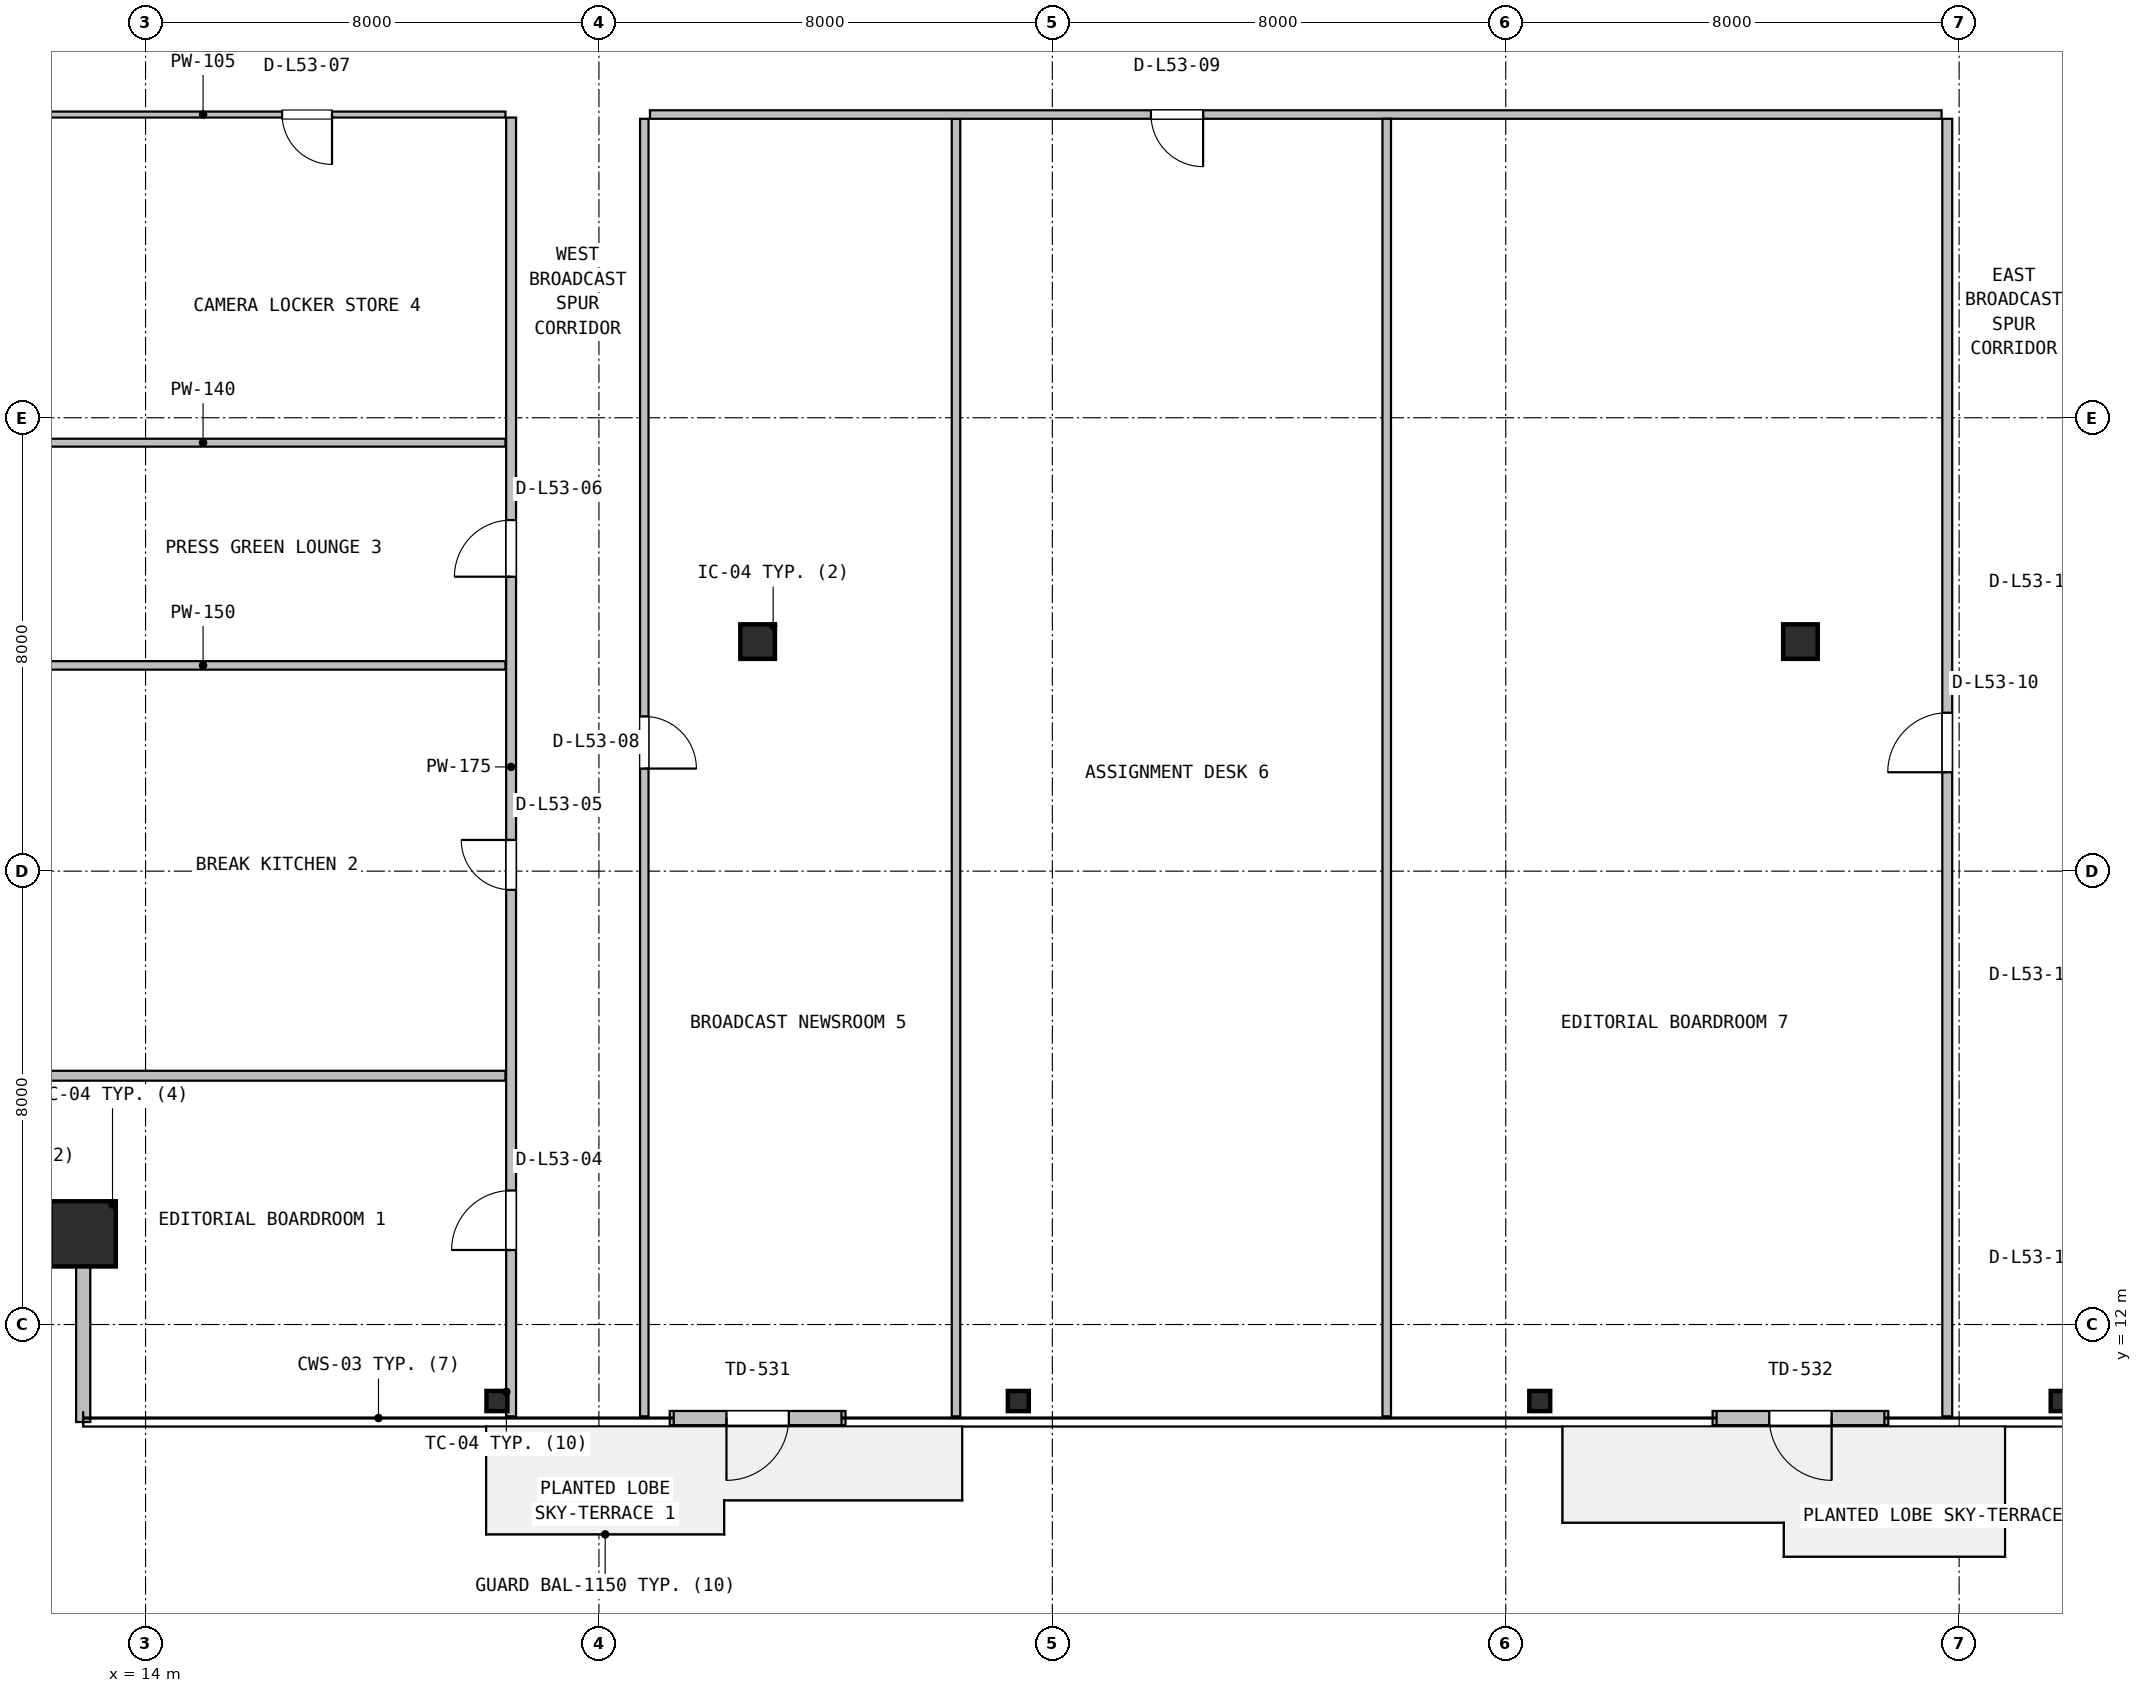
"""IFC4 building model, lengths in metres.
Left out: names, types, materials, properties, quantities, classifications, styles, units other than length and angle.
Written with IfcOpenShell. Run it as: python <this file> out.ifc"""

import sys

from ifc_helpers import new_model, si_unit, direction, frame, frame_2d, origin, origin_2d, place, context, subcontext, project, spatial, rectangle, hollow_rectangle, hollow_circle, i_section, extrude, source, transform, mapped, element, fill, save


model = new_model("IFC4")
c1 = context("Model", 3, precision=1e-05, world=origin(), true_north=direction((0.0, 1.0)))
c2 = subcontext(c1, "Body", "Model", "MODEL_VIEW")
j1 = project(units=[si_unit("LENGTHUNIT", "METRE"), si_unit("PLANEANGLEUNIT", "RADIAN")], contexts=[c1])
p1 = place(None, origin())
s1 = spatial("IfcSite", under=j1, at=p1, CompositionType="ELEMENT")
p2 = place(p1, origin())
s2 = spatial("IfcBuilding", under=s1, at=p2, CompositionType="ELEMENT")
p3 = place(p2, frame((0.0, 0.0, 215.0)))
s3 = spatial("IfcBuildingStorey", under=s2, at=p3, CompositionType="ELEMENT", Elevation=215.0)
m1 = source(origin(), c2, "Body", "SweptSolid", [
    extrude(hollow_rectangle(XDim=1.15, YDim=1.15, WallThickness=0.045, at=origin_2d()), origin(), (0.0, 0.0, 1.0), 3.8),
])
p4 = place(p3, frame((12.9, 13.6, 0.0), z_axis=(0.0, 0.0, 1.0), x_axis=(1.0, 0.0, 0.0)))
e1 = element("IfcColumn", 1, at=p4, inside=s3, PredefinedType="COLUMN", context=c2, shape_type="MappedRepresentation", body=[
    mapped(m1, transform((0.0, 0.0, 0.0), x_axis=(1.0, 0.0, 0.0), y_axis=(0.0, 1.0, 0.0), z_axis=(0.0, 0.0, 1.0), scale=1.0)),
])
m2 = source(origin(), c2, "Body", "SweptSolid", [
    extrude(i_section(OverallWidth=0.369, OverallDepth=0.356, WebThickness=0.011, FlangeThickness=0.018, FilletRadius=0.016, at=origin_2d()), origin(), (0.0, 0.0, 1.0), 3.8),
])
for number, where, z_axis, x_axis in (
    (2, (20.2, 10.65, 0.0), (0.0, 0.0, 1.0), (1.0, 0.0, 0.0)),
    (3, (29.4, 10.65, 0.0), (0.0, 0.0, 1.0), (1.0, 0.0, 0.0)),
    (4, (38.6, 10.65, 0.0), (0.0, 0.0, 1.0), (1.0, 0.0, 0.0)),
    (5, (47.8, 10.65, 0.0), (0.0, 0.0, 1.0), (1.0, 0.0, 0.0)),
):
    element("IfcColumn", number, at=place(p3, frame(where, z_axis=z_axis, x_axis=x_axis)), inside=s3, PredefinedType="COLUMN", context=c2, shape_type="MappedRepresentation", body=[
        mapped(m2, transform((0.0, 0.0, 0.0), x_axis=(1.0, 0.0, 0.0), y_axis=(0.0, 1.0, 0.0), z_axis=(0.0, 0.0, 1.0), scale=1.0)),
    ])
m3 = source(origin(), c2, "Body", "SweptSolid", [
    extrude(hollow_circle(Radius=0.305, WallThickness=0.025, at=origin_2d()), origin(), (0.0, 0.0, 1.0), 3.8),
])
for number, where, z_axis, x_axis in (
    (6, (24.8, 24.05, 0.0), (0.0, 0.0, 1.0), (1.0, 0.0, 0.0)),
    (7, (43.2, 24.05, 0.0), (0.0, 0.0, 1.0), (1.0, 0.0, 0.0)),
):
    element("IfcColumn", number, at=place(p3, frame(where, z_axis=z_axis, x_axis=x_axis)), inside=s3, PredefinedType="COLUMN", context=c2, shape_type="MappedRepresentation", body=[
        mapped(m3, transform((0.0, 0.0, 0.0), x_axis=(1.0, 0.0, 0.0), y_axis=(0.0, 1.0, 0.0), z_axis=(0.0, 0.0, 1.0), scale=1.0)),
    ])
p5 = place(p3, frame((23.25, 10.35, 0.0), z_axis=(0.0, 0.0, 1.0), x_axis=(1.0, 0.0, 0.0)))
e8 = element("IfcWall", 8, at=p5, inside=s3, PredefinedType="SOLIDWALL", context=c2, shape_type="SweptSolid", body=[
    extrude(rectangle(XDim=3.1, YDim=0.25, at=frame_2d((1.55, 0.0))), origin(), (0.0, 0.0, 1.0), 3.53),
])
p6 = place(p5, frame((1.0, 0.0, 0.0)))
e9 = element("IfcOpeningElement", 9, at=p6, cuts=e8, PredefinedType="OPENING", context=c2, shape_type="SweptSolid", body=[
    extrude(rectangle(XDim=1.1, YDim=2.15, at=frame_2d((0.55, 1.075))), frame((0.0, 0.135, 0.0), z_axis=(0.0, -1.0, 0.0), x_axis=(1.0, 0.0, 0.0)), (0.0, 0.0, 1.0), 0.27),
])
p7 = place(p3, frame((41.65, 10.35, 0.0), z_axis=(0.0, 0.0, 1.0), x_axis=(1.0, 0.0, 0.0)))
e10 = element("IfcWall", 10, at=p7, inside=s3, PredefinedType="SOLIDWALL", context=c2, shape_type="SweptSolid", body=[
    extrude(rectangle(XDim=3.1, YDim=0.25, at=frame_2d((1.55, 0.0))), origin(), (0.0, 0.0, 1.0), 3.53),
])
p8 = place(p7, frame((1.0, 0.0, 0.0)))
e11 = element("IfcOpeningElement", 11, at=p8, cuts=e10, PredefinedType="OPENING", context=c2, shape_type="SweptSolid", body=[
    extrude(rectangle(XDim=1.1, YDim=2.15, at=frame_2d((0.55, 1.075))), frame((0.0, 0.135, 0.0), z_axis=(0.0, -1.0, 0.0), x_axis=(1.0, 0.0, 0.0)), (0.0, 0.0, 1.0), 0.27),
])
p9 = place(p3, frame((12.9, 10.28, 0.0), z_axis=(0.0, 0.0, 1.0), x_axis=(0.0, 1.0, 0.0)))
e12 = element("IfcWall", 12, at=p9, inside=s3, PredefinedType="SOLIDWALL", context=c2, shape_type="SweptSolid", body=[
    extrude(rectangle(XDim=3.4, YDim=0.25, at=frame_2d((1.7, 0.0))), origin(), (0.0, 0.0, 1.0), 3.171),
])
p10 = place(p3, frame((20.45, 10.38, 0.0), z_axis=(0.0, 0.0, 1.0), x_axis=(0.0, 1.0, 0.0)))
e13 = element("IfcWall", 13, at=p10, inside=s3, PredefinedType="PARTITIONING", context=c2, shape_type="SweptSolid", body=[
    extrude(rectangle(XDim=22.917, YDim=0.175, at=frame_2d((11.458, 0.0))), origin(), (0.0, 0.0, 1.0), 3.171),
])
p11 = place(p10, frame((2.935, 0.0, 0.0)))
e14 = element("IfcOpeningElement", 14, at=p11, cuts=e13, PredefinedType="OPENING", context=c2, shape_type="SweptSolid", body=[
    extrude(rectangle(XDim=1.05, YDim=2.1, at=frame_2d((0.525, 1.05))), frame((0.0, 0.098, 0.0), z_axis=(0.0, -1.0, 0.0), x_axis=(1.0, 0.0, 0.0)), (0.0, 0.0, 1.0), 0.195),
])
p12 = place(p10, frame((9.29, 0.0, 0.0)))
e15 = element("IfcOpeningElement", 15, at=p12, cuts=e13, PredefinedType="OPENING", context=c2, shape_type="SweptSolid", body=[
    extrude(rectangle(XDim=0.88, YDim=2.06, at=frame_2d((0.44, 1.03))), frame((0.0, 0.098, 0.0), z_axis=(0.0, -1.0, 0.0), x_axis=(1.0, 0.0, 0.0)), (0.0, 0.0, 1.0), 0.195),
])
p13 = place(p10, frame((14.815, 0.0, 0.0)))
e16 = element("IfcOpeningElement", 16, at=p13, cuts=e13, PredefinedType="OPENING", context=c2, shape_type="SweptSolid", body=[
    extrude(rectangle(XDim=1.0, YDim=2.1, at=frame_2d((0.5, 1.05))), frame((0.0, 0.098, 0.0), z_axis=(0.0, -1.0, 0.0), x_axis=(1.0, 0.0, 0.0)), (0.0, 0.0, 1.0), 0.195),
])
p14 = place(p3, frame((9.68, 16.39, 0.0), z_axis=(0.0, 0.0, 1.0), x_axis=(1.0, 0.0, 0.0)))
e17 = element("IfcWall", 17, at=p14, inside=s3, PredefinedType="PARTITIONING", context=c2, shape_type="SweptSolid", body=[
    extrude(rectangle(XDim=10.67, YDim=0.175, at=frame_2d((5.335, 0.0))), origin(), (0.0, 0.0, 1.0), 3.171),
])
p15 = place(p3, frame((9.68, 23.63, 0.0), z_axis=(0.0, 0.0, 1.0), x_axis=(1.0, 0.0, 0.0)))
e18 = element("IfcWall", 18, at=p15, inside=s3, PredefinedType="PARTITIONING", context=c2, shape_type="SweptSolid", body=[
    extrude(rectangle(XDim=10.67, YDim=0.15, at=frame_2d((5.335, 0.0))), origin(), (0.0, 0.0, 1.0), 3.171),
])
p16 = place(p3, frame((9.68, 27.56, 0.0), z_axis=(0.0, 0.0, 1.0), x_axis=(1.0, 0.0, 0.0)))
e19 = element("IfcWall", 19, at=p16, inside=s3, PredefinedType="PARTITIONING", context=c2, shape_type="SweptSolid", body=[
    extrude(rectangle(XDim=10.67, YDim=0.14, at=frame_2d((5.335, 0.0))), origin(), (0.0, 0.0, 1.0), 3.171),
])
p17 = place(p3, frame((9.68, 33.35, 0.0), z_axis=(0.0, 0.0, 1.0), x_axis=(1.0, 0.0, 0.0)))
e20 = element("IfcWall", 20, at=p17, inside=s3, PredefinedType="PARTITIONING", context=c2, shape_type="SweptSolid", body=[
    extrude(rectangle(XDim=10.67, YDim=0.105, at=frame_2d((5.335, 0.0))), origin(), (0.0, 0.0, 1.0), 3.171),
])
p18 = place(p17, frame((6.73, 0.0, 0.0)))
e21 = element("IfcOpeningElement", 21, at=p18, cuts=e20, PredefinedType="OPENING", context=c2, shape_type="SweptSolid", body=[
    extrude(rectangle(XDim=0.88, YDim=2.06, at=frame_2d((0.44, 1.03))), frame((0.0, 0.062, 0.0), z_axis=(0.0, -1.0, 0.0), x_axis=(1.0, 0.0, 0.0)), (0.0, 0.0, 1.0), 0.125),
])
p19 = place(p3, frame((28.3, 10.38, 0.0), z_axis=(0.0, 0.0, 1.0), x_axis=(0.0, 1.0, 0.0)))
e22 = element("IfcWall", 22, at=p19, inside=s3, PredefinedType="PARTITIONING", context=c2, shape_type="SweptSolid", body=[
    extrude(rectangle(XDim=22.895, YDim=0.15, at=frame_2d((11.448, 0.0))), origin(), (0.0, 0.0, 1.0), 2.908),
])
p20 = place(p3, frame((22.9, 33.35, 0.0), z_axis=(0.0, 0.0, 1.0), x_axis=(1.0, 0.0, 0.0)))
e23 = element("IfcWall", 23, at=p20, inside=s3, PredefinedType="PARTITIONING", context=c2, shape_type="SweptSolid", body=[
    extrude(rectangle(XDim=22.79, YDim=0.15, at=frame_2d((11.395, 0.0))), origin(), (0.0, 0.0, 1.0), 2.908),
])
p21 = place(p20, frame((8.84, 0.0, 0.0)))
e24 = element("IfcOpeningElement", 24, at=p21, cuts=e23, PredefinedType="OPENING", context=c2, shape_type="SweptSolid", body=[
    extrude(rectangle(XDim=0.92, YDim=2.08, at=frame_2d((0.46, 1.04))), frame((0.0, 0.085, 0.0), z_axis=(0.0, -1.0, 0.0), x_axis=(1.0, 0.0, 0.0)), (0.0, 0.0, 1.0), 0.17),
])
p22 = place(p3, frame((22.8, 10.38, 0.0), z_axis=(0.0, 0.0, 1.0), x_axis=(0.0, 1.0, 0.0)))
e25 = element("IfcWall", 25, at=p22, inside=s3, PredefinedType="PARTITIONING", context=c2, shape_type="SweptSolid", body=[
    extrude(rectangle(XDim=22.895, YDim=0.15, at=frame_2d((11.448, 0.0))), origin(), (0.0, 0.0, 1.0), 3.171),
])
p23 = place(p22, frame((11.43, 0.0, 0.0)))
e26 = element("IfcOpeningElement", 26, at=p23, cuts=e25, PredefinedType="OPENING", context=c2, shape_type="SweptSolid", body=[
    extrude(rectangle(XDim=0.92, YDim=2.08, at=frame_2d((0.46, 1.04))), frame((0.0, 0.085, 0.0), z_axis=(0.0, -1.0, 0.0), x_axis=(1.0, 0.0, 0.0)), (0.0, 0.0, 1.0), 0.17),
])
p24 = place(p3, frame((35.9, 10.38, 0.0), z_axis=(0.0, 0.0, 1.0), x_axis=(0.0, 1.0, 0.0)))
e27 = element("IfcWall", 27, at=p24, inside=s3, PredefinedType="PARTITIONING", context=c2, shape_type="SweptSolid", body=[
    extrude(rectangle(XDim=22.895, YDim=0.15, at=frame_2d((11.448, 0.0))), origin(), (0.0, 0.0, 1.0), 2.908),
])
p25 = place(p3, frame((45.79, 10.38, 0.0), z_axis=(0.0, 0.0, 1.0), x_axis=(0.0, 1.0, 0.0)))
e28 = element("IfcWall", 28, at=p25, inside=s3, PredefinedType="PARTITIONING", context=c2, shape_type="SweptSolid", body=[
    extrude(rectangle(XDim=22.895, YDim=0.175, at=frame_2d((11.448, 0.0))), origin(), (0.0, 0.0, 1.0), 2.908),
])
p26 = place(p25, frame((11.365, 0.0, 0.0)))
e29 = element("IfcOpeningElement", 29, at=p26, cuts=e28, PredefinedType="OPENING", context=c2, shape_type="SweptSolid", body=[
    extrude(rectangle(XDim=1.05, YDim=2.1, at=frame_2d((0.525, 1.05))), frame((0.0, 0.098, 0.0), z_axis=(0.0, -1.0, 0.0), x_axis=(1.0, 0.0, 0.0)), (0.0, 0.0, 1.0), 0.195),
])
m4 = source(origin(), c2, "Body", "SweptSolid", [
    extrude(rectangle(XDim=1.1, YDim=2.15, at=frame_2d((0.55, 1.075))), frame((0.0, 0.025, 0.0), z_axis=(0.0, -1.0, 0.0), x_axis=(1.0, 0.0, 0.0)), (0.0, 0.0, 1.0), 0.05),
])
p27 = place(p6, frame((1.1, 0.0, 0.0), z_axis=(0.0, 0.0, 1.0), x_axis=(-1.0, 0.0, 0.0)))
e30 = element("IfcDoor", 30, at=p27, inside=s3, OperationType="SINGLE_SWING_LEFT", PredefinedType="DOOR", context=c2, shape_type="MappedRepresentation", body=[
    mapped(m4, transform((0.0, 0.0, 0.0), x_axis=(1.0, 0.0, 0.0), y_axis=(0.0, 1.0, 0.0), z_axis=(0.0, 0.0, 1.0), scale=1.0)),
])
fill(e9, e30)
p28 = place(p8, frame((1.1, 0.0, 0.0), z_axis=(0.0, 0.0, 1.0), x_axis=(-1.0, 0.0, 0.0)))
e31 = element("IfcDoor", 31, at=p28, inside=s3, OperationType="SINGLE_SWING_RIGHT", PredefinedType="DOOR", context=c2, shape_type="MappedRepresentation", body=[
    mapped(m4, transform((0.0, 0.0, 0.0), x_axis=(1.0, 0.0, 0.0), y_axis=(0.0, 1.0, 0.0), z_axis=(0.0, 0.0, 1.0), scale=1.0)),
])
fill(e11, e31)
m5 = source(origin(), c2, "Body", "SweptSolid", [
    extrude(rectangle(XDim=1.05, YDim=2.1, at=frame_2d((0.525, 1.05))), frame((0.0, 0.025, 0.0), z_axis=(0.0, -1.0, 0.0), x_axis=(1.0, 0.0, 0.0)), (0.0, 0.0, 1.0), 0.05),
])
p29 = place(p11, origin())
e32 = element("IfcDoor", 32, at=p29, inside=s3, OperationType="SINGLE_SWING_LEFT", PredefinedType="DOOR", context=c2, shape_type="MappedRepresentation", body=[
    mapped(m5, transform((0.0, 0.0, 0.0), x_axis=(1.0, 0.0, 0.0), y_axis=(0.0, 1.0, 0.0), z_axis=(0.0, 0.0, 1.0), scale=1.0)),
])
fill(e14, e32)
m6 = source(origin(), c2, "Body", "SweptSolid", [
    extrude(rectangle(XDim=0.88, YDim=2.06, at=frame_2d((0.44, 1.03))), frame((0.0, 0.025, 0.0), z_axis=(0.0, -1.0, 0.0), x_axis=(1.0, 0.0, 0.0)), (0.0, 0.0, 1.0), 0.05),
])
p30 = place(p12, origin())
e33 = element("IfcDoor", 33, at=p30, inside=s3, OperationType="SINGLE_SWING_RIGHT", PredefinedType="DOOR", context=c2, shape_type="MappedRepresentation", body=[
    mapped(m6, transform((0.0, 0.0, 0.0), x_axis=(1.0, 0.0, 0.0), y_axis=(0.0, 1.0, 0.0), z_axis=(0.0, 0.0, 1.0), scale=1.0)),
])
fill(e15, e33)
m7 = source(origin(), c2, "Body", "SweptSolid", [
    extrude(rectangle(XDim=1.0, YDim=2.1, at=frame_2d((0.5, 1.05))), frame((0.0, 0.025, 0.0), z_axis=(0.0, -1.0, 0.0), x_axis=(1.0, 0.0, 0.0)), (0.0, 0.0, 1.0), 0.05),
])
p31 = place(p13, origin())
e34 = element("IfcDoor", 34, at=p31, inside=s3, OperationType="SINGLE_SWING_LEFT", PredefinedType="DOOR", context=c2, shape_type="MappedRepresentation", body=[
    mapped(m7, transform((0.0, 0.0, 0.0), x_axis=(1.0, 0.0, 0.0), y_axis=(0.0, 1.0, 0.0), z_axis=(0.0, 0.0, 1.0), scale=1.0)),
])
fill(e16, e34)
p32 = place(p18, frame((0.88, 0.0, 0.0), z_axis=(0.0, 0.0, 1.0), x_axis=(-1.0, 0.0, 0.0)))
e35 = element("IfcDoor", 35, at=p32, inside=s3, OperationType="SINGLE_SWING_RIGHT", PredefinedType="DOOR", context=c2, shape_type="MappedRepresentation", body=[
    mapped(m6, transform((0.0, 0.0, 0.0), x_axis=(1.0, 0.0, 0.0), y_axis=(0.0, 1.0, 0.0), z_axis=(0.0, 0.0, 1.0), scale=1.0)),
])
fill(e21, e35)
m8 = source(origin(), c2, "Body", "SweptSolid", [
    extrude(rectangle(XDim=0.92, YDim=2.08, at=frame_2d((0.46, 1.04))), frame((0.0, 0.025, 0.0), z_axis=(0.0, -1.0, 0.0), x_axis=(1.0, 0.0, 0.0)), (0.0, 0.0, 1.0), 0.05),
])
p33 = place(p23, frame((0.92, 0.0, 0.0), z_axis=(0.0, 0.0, 1.0), x_axis=(-1.0, 0.0, 0.0)))
e36 = element("IfcDoor", 36, at=p33, inside=s3, OperationType="SINGLE_SWING_LEFT", PredefinedType="DOOR", context=c2, shape_type="MappedRepresentation", body=[
    mapped(m8, transform((0.0, 0.0, 0.0), x_axis=(1.0, 0.0, 0.0), y_axis=(0.0, 1.0, 0.0), z_axis=(0.0, 0.0, 1.0), scale=1.0)),
])
fill(e26, e36)
p34 = place(p21, frame((0.92, 0.0, 0.0), z_axis=(0.0, 0.0, 1.0), x_axis=(-1.0, 0.0, 0.0)))
e37 = element("IfcDoor", 37, at=p34, inside=s3, OperationType="SINGLE_SWING_RIGHT", PredefinedType="DOOR", context=c2, shape_type="MappedRepresentation", body=[
    mapped(m8, transform((0.0, 0.0, 0.0), x_axis=(1.0, 0.0, 0.0), y_axis=(0.0, 1.0, 0.0), z_axis=(0.0, 0.0, 1.0), scale=1.0)),
])
fill(e24, e37)
p35 = place(p26, origin())
e38 = element("IfcDoor", 38, at=p35, inside=s3, OperationType="SINGLE_SWING_LEFT", PredefinedType="DOOR", context=c2, shape_type="MappedRepresentation", body=[
    mapped(m5, transform((0.0, 0.0, 0.0), x_axis=(1.0, 0.0, 0.0), y_axis=(0.0, 1.0, 0.0), z_axis=(0.0, 0.0, 1.0), scale=1.0)),
])
fill(e29, e38)
save(model, sys.argv[1])
